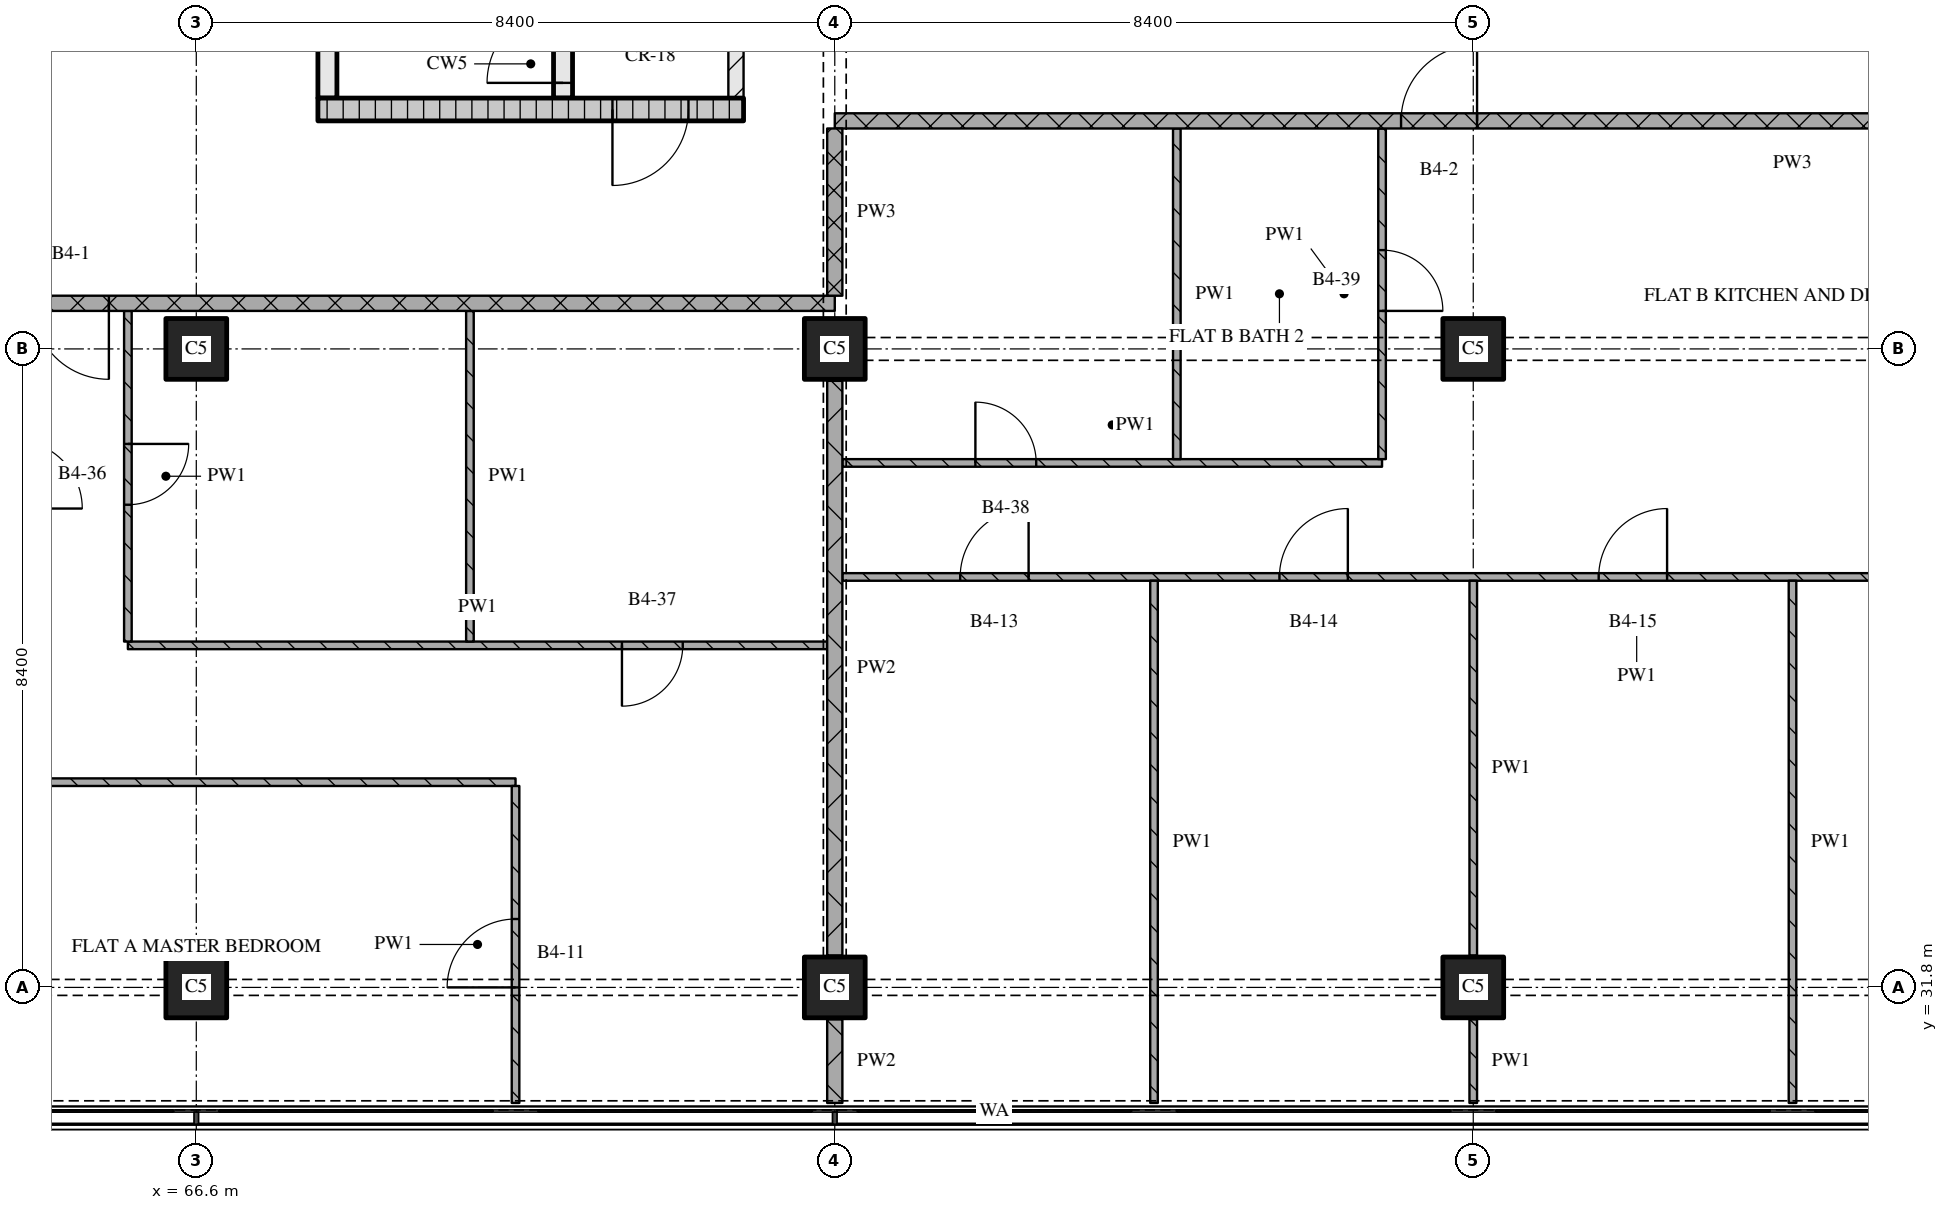
"""IFC4 building model, lengths in metres.
Left out: names, types, materials, properties, quantities, classifications, styles, units other than length and angle.
Written with IfcOpenShell. Run it as: python <this file> out.ifc"""

import sys

from ifc_helpers import new_model, si_unit, direction, frame, frame_2d, origin, origin_2d, place, context, subcontext, project, spatial, rectangle, extrude, element, fill, save


model = new_model("IFC4")
c1 = context("Model", 3, precision=1e-05, world=origin(), true_north=direction((0.0, 1.0)))
c2 = subcontext(c1, "Body", "Model", "MODEL_VIEW")
j1 = project(units=[si_unit("LENGTHUNIT", "METRE"), si_unit("PLANEANGLEUNIT", "RADIAN")], contexts=[c1])
p1 = place(None, origin())
s1 = spatial("IfcSite", under=j1, at=p1, CompositionType="ELEMENT")
p2 = place(p1, origin())
s2 = spatial("IfcBuilding", under=s1, at=p2, CompositionType="ELEMENT")
p3 = place(p2, frame((0.0, 0.0, 134.85)))
s3 = spatial("IfcBuildingStorey", under=s2, at=p3, CompositionType="ELEMENT", Elevation=134.85)
for number, where, z_axis, x_axis in (
    (1, (66.6, 31.8, 0.0), (0.0, 0.0, 1.0), (1.0, 0.0, 0.0)),
    (2, (66.6, 40.2, 0.0), (0.0, 0.0, 1.0), (1.0, 0.0, 0.0)),
    (3, (75.0, 31.8, 0.0), (0.0, 0.0, 1.0), (1.0, 0.0, 0.0)),
    (4, (75.0, 40.2, 0.0), (0.0, 0.0, 1.0), (1.0, 0.0, 0.0)),
    (5, (83.4, 31.8, 0.0), (0.0, 0.0, 1.0), (1.0, 0.0, 0.0)),
    (6, (83.4, 40.2, 0.0), (0.0, 0.0, 1.0), (1.0, 0.0, 0.0)),
):
    element("IfcColumn", number, at=place(p3, frame(where, z_axis=z_axis, x_axis=x_axis)), inside=s3, PredefinedType="COLUMN", context=c2, shape_type="SweptSolid", body=[
        extrude(rectangle(XDim=0.8, YDim=0.8, at=origin_2d()), origin(), (0.0, 0.0, 1.0), 3.6),
    ])
p4 = place(p3, frame((68.2, 43.35, 0.0), z_axis=(0.0, 0.0, 1.0), x_axis=(1.0, 0.0, 0.0)))
e7 = element("IfcWall", 7, at=p4, inside=s3, PredefinedType="SOLIDWALL", context=c2, shape_type="SweptSolid", body=[
    extrude(rectangle(XDim=5.6, YDim=0.3, at=frame_2d((2.8, 0.0))), origin(), (0.0, 0.0, 1.0), 3.32),
])
p5 = place(p4, frame((3.875, 0.0, 0.0)))
e8 = element("IfcOpeningElement", 8, at=p5, cuts=e7, PredefinedType="OPENING", context=c2, shape_type="SweptSolid", body=[
    extrude(rectangle(XDim=1.0, YDim=2.1, at=frame_2d((0.5, 1.05))), frame((0.0, 0.16, 0.0), z_axis=(0.0, -1.0, 0.0), x_axis=(1.0, 0.0, 0.0)), (0.0, 0.0, 1.0), 0.32),
])
p6 = place(p3, frame((68.325, 43.5, 0.0), z_axis=(0.0, 0.0, 1.0), x_axis=(0.0, 1.0, 0.0)))
e9 = element("IfcWall", 9, at=p6, inside=s3, PredefinedType="SOLIDWALL", context=c2, shape_type="SweptSolid", body=[
    extrude(rectangle(XDim=6.9, YDim=0.25, at=frame_2d((3.45, 0.0))), origin(), (0.0, 0.0, 1.0), 3.32),
])
p7 = place(p3, frame((71.425, 43.5, 0.0), z_axis=(0.0, 0.0, 1.0), x_axis=(0.0, 1.0, 0.0)))
e10 = element("IfcWall", 10, at=p7, inside=s3, PredefinedType="SOLIDWALL", context=c2, shape_type="SweptSolid", body=[
    extrude(rectangle(XDim=6.9, YDim=0.25, at=frame_2d((3.45, 0.0))), origin(), (0.0, 0.0, 1.0), 3.32),
])
p8 = place(p7, frame((0.2, 0.0, 0.0)))
e11 = element("IfcOpeningElement", 11, at=p8, cuts=e10, PredefinedType="OPENING", context=c2, shape_type="SweptSolid", body=[
    extrude(rectangle(XDim=1.0, YDim=2.1, at=frame_2d((0.5, 1.05))), frame((0.0, 0.135, 0.0), z_axis=(0.0, -1.0, 0.0), x_axis=(1.0, 0.0, 0.0)), (0.0, 0.0, 1.0), 0.27),
])
p9 = place(p3, frame((73.7, 43.5, 0.0), z_axis=(0.0, 0.0, 1.0), x_axis=(0.0, 1.0, 0.0)))
e12 = element("IfcWall", 12, at=p9, inside=s3, PredefinedType="PARTITIONING", context=c2, shape_type="SweptSolid", body=[
    extrude(rectangle(XDim=6.9, YDim=0.2, at=frame_2d((3.45, 0.0))), origin(), (0.0, 0.0, 1.0), 3.32),
])
p10 = place(p9, frame((1.0, 0.0, 0.0)))
e13 = element("IfcOpeningElement", 13, at=p10, cuts=e12, PredefinedType="OPENING", context=c2, shape_type="SweptSolid", body=[
    extrude(rectangle(XDim=1.0, YDim=2.1, at=frame_2d((0.5, 1.05))), frame((0.0, 0.11, 0.0), z_axis=(0.0, -1.0, 0.0), x_axis=(1.0, 0.0, 0.0)), (0.0, 0.0, 1.0), 0.22),
])
p11 = place(p3, frame((70.8, 34.5, 0.0), z_axis=(0.0, 0.0, 1.0), x_axis=(-1.0, 0.0, 0.0)))
e14 = element("IfcWall", 14, at=p11, inside=s3, PredefinedType="PARTITIONING", context=c2, shape_type="SweptSolid", body=[
    extrude(rectangle(XDim=22.52, YDim=0.1, at=frame_2d((11.26, 0.0))), origin(), (0.0, 0.0, 1.0), 3.32),
])
p12 = place(p11, frame((10.05, 0.0, 0.0)))
e15 = element("IfcOpeningElement", 15, at=p12, cuts=e14, PredefinedType="OPENING", context=c2, shape_type="SweptSolid", body=[
    extrude(rectangle(XDim=0.9, YDim=2.1, at=frame_2d((0.45, 1.05))), frame((0.0, 0.06, 0.0), z_axis=(0.0, -1.0, 0.0), x_axis=(1.0, 0.0, 0.0)), (0.0, 0.0, 1.0), 0.12),
])
p13 = place(p11, frame((14.25, 0.0, 0.0)))
e16 = element("IfcOpeningElement", 16, at=p13, cuts=e14, PredefinedType="OPENING", context=c2, shape_type="SweptSolid", body=[
    extrude(rectangle(XDim=0.9, YDim=2.1, at=frame_2d((0.45, 1.05))), frame((0.0, 0.06, 0.0), z_axis=(0.0, -1.0, 0.0), x_axis=(1.0, 0.0, 0.0)), (0.0, 0.0, 1.0), 0.12),
])
p14 = place(p11, frame((17.654, 0.0, 0.0)))
e17 = element("IfcOpeningElement", 17, at=p14, cuts=e14, PredefinedType="OPENING", context=c2, shape_type="SweptSolid", body=[
    extrude(rectangle(XDim=0.9, YDim=2.1, at=frame_2d((0.45, 1.05))), frame((0.0, 0.06, 0.0), z_axis=(0.0, -1.0, 0.0), x_axis=(1.0, 0.0, 0.0)), (0.0, 0.0, 1.0), 0.12),
])
p15 = place(p3, frame((65.7, 36.3, 0.0), z_axis=(0.0, 0.0, 1.0), x_axis=(1.0, 0.0, 0.0)))
e18 = element("IfcWall", 18, at=p15, inside=s3, PredefinedType="PARTITIONING", context=c2, shape_type="SweptSolid", body=[
    extrude(rectangle(XDim=9.2, YDim=0.1, at=frame_2d((4.6, 0.0))), origin(), (0.0, 0.0, 1.0), 3.32),
])
p16 = place(p15, frame((6.5, 0.0, 0.0)))
e19 = element("IfcOpeningElement", 19, at=p16, cuts=e18, PredefinedType="OPENING", context=c2, shape_type="SweptSolid", body=[
    extrude(rectangle(XDim=0.8, YDim=2.1, at=frame_2d((0.4, 1.05))), frame((0.0, 0.06, 0.0), z_axis=(0.0, -1.0, 0.0), x_axis=(1.0, 0.0, 0.0)), (0.0, 0.0, 1.0), 0.12),
])
p17 = place(p3, frame((96.0, 37.2, 0.0), z_axis=(0.0, 0.0, 1.0), x_axis=(-1.0, 0.0, 0.0)))
e20 = element("IfcWall", 20, at=p17, inside=s3, PredefinedType="PARTITIONING", context=c2, shape_type="SweptSolid", body=[
    extrude(rectangle(XDim=20.9, YDim=0.1, at=frame_2d((10.45, 0.0))), origin(), (0.0, 0.0, 1.0), 3.32),
])
p18 = place(p17, frame((10.05, 0.0, 0.0)))
e21 = element("IfcOpeningElement", 21, at=p18, cuts=e20, PredefinedType="OPENING", context=c2, shape_type="SweptSolid", body=[
    extrude(rectangle(XDim=0.9, YDim=2.1, at=frame_2d((0.45, 1.05))), frame((0.0, 0.06, 0.0), z_axis=(0.0, -1.0, 0.0), x_axis=(1.0, 0.0, 0.0)), (0.0, 0.0, 1.0), 0.12),
])
p19 = place(p17, frame((14.25, 0.0, 0.0)))
e22 = element("IfcOpeningElement", 22, at=p19, cuts=e20, PredefinedType="OPENING", context=c2, shape_type="SweptSolid", body=[
    extrude(rectangle(XDim=0.9, YDim=2.1, at=frame_2d((0.45, 1.05))), frame((0.0, 0.06, 0.0), z_axis=(0.0, -1.0, 0.0), x_axis=(1.0, 0.0, 0.0)), (0.0, 0.0, 1.0), 0.12),
])
p20 = place(p17, frame((18.45, 0.0, 0.0)))
e23 = element("IfcOpeningElement", 23, at=p20, cuts=e20, PredefinedType="OPENING", context=c2, shape_type="SweptSolid", body=[
    extrude(rectangle(XDim=0.9, YDim=2.1, at=frame_2d((0.45, 1.05))), frame((0.0, 0.06, 0.0), z_axis=(0.0, -1.0, 0.0), x_axis=(1.0, 0.0, 0.0)), (0.0, 0.0, 1.0), 0.12),
])
p21 = place(p3, frame((75.1, 38.7, 0.0), z_axis=(0.0, 0.0, 1.0), x_axis=(1.0, 0.0, 0.0)))
e24 = element("IfcWall", 24, at=p21, inside=s3, PredefinedType="PARTITIONING", context=c2, shape_type="SweptSolid", body=[
    extrude(rectangle(XDim=7.1, YDim=0.1, at=frame_2d((3.55, 0.0))), origin(), (0.0, 0.0, 1.0), 3.32),
])
p22 = place(p21, frame((1.75, 0.0, 0.0)))
e25 = element("IfcOpeningElement", 25, at=p22, cuts=e24, PredefinedType="OPENING", context=c2, shape_type="SweptSolid", body=[
    extrude(rectangle(XDim=0.8, YDim=2.1, at=frame_2d((0.4, 1.05))), frame((0.0, 0.06, 0.0), z_axis=(0.0, -1.0, 0.0), x_axis=(1.0, 0.0, 0.0)), (0.0, 0.0, 1.0), 0.12),
])
p23 = place(p3, frame((75.0, 40.8, 0.0), z_axis=(0.0, 0.0, 1.0), x_axis=(-1.0, 0.0, 0.0)))
e26 = element("IfcWall", 26, at=p23, inside=s3, PredefinedType="PARTITIONING", context=c2, shape_type="SweptSolid", body=[
    extrude(rectangle(XDim=24.18, YDim=0.2, at=frame_2d((12.09, 0.0))), origin(), (0.0, 0.0, 1.0), 3.32),
])
p24 = place(p23, frame((9.55, 0.0, 0.0)))
e27 = element("IfcOpeningElement", 27, at=p24, cuts=e26, PredefinedType="OPENING", context=c2, shape_type="SweptSolid", body=[
    extrude(rectangle(XDim=1.0, YDim=2.1, at=frame_2d((0.5, 1.05))), frame((0.0, 0.11, 0.0), z_axis=(0.0, -1.0, 0.0), x_axis=(1.0, 0.0, 0.0)), (0.0, 0.0, 1.0), 0.22),
])
p25 = place(p3, frame((100.2, 43.2, 0.0), z_axis=(0.0, 0.0, 1.0), x_axis=(-1.0, 0.0, 0.0)))
e28 = element("IfcWall", 28, at=p25, inside=s3, PredefinedType="PARTITIONING", context=c2, shape_type="SweptSolid", body=[
    extrude(rectangle(XDim=25.2, YDim=0.2, at=frame_2d((12.6, 0.0))), origin(), (0.0, 0.0, 1.0), 3.32),
])
p26 = place(p25, frame((16.75, 0.0, 0.0)))
e29 = element("IfcOpeningElement", 29, at=p26, cuts=e28, PredefinedType="OPENING", context=c2, shape_type="SweptSolid", body=[
    extrude(rectangle(XDim=1.0, YDim=2.1, at=frame_2d((0.5, 1.05))), frame((0.0, 0.11, 0.0), z_axis=(0.0, -1.0, 0.0), x_axis=(1.0, 0.0, 0.0)), (0.0, 0.0, 1.0), 0.22),
])
p27 = place(p3, frame((65.7, 40.7, 0.0), z_axis=(0.0, 0.0, 1.0), x_axis=(0.0, -1.0, 0.0)))
e30 = element("IfcWall", 30, at=p27, inside=s3, PredefinedType="PARTITIONING", context=c2, shape_type="SweptSolid", body=[
    extrude(rectangle(XDim=4.35, YDim=0.1, at=frame_2d((2.175, 0.0))), origin(), (0.0, 0.0, 1.0), 3.32),
])
p28 = place(p27, frame((1.75, 0.0, 0.0)))
e31 = element("IfcOpeningElement", 31, at=p28, cuts=e30, PredefinedType="OPENING", context=c2, shape_type="SweptSolid", body=[
    extrude(rectangle(XDim=0.8, YDim=2.1, at=frame_2d((0.4, 1.05))), frame((0.0, 0.06, 0.0), z_axis=(0.0, -1.0, 0.0), x_axis=(1.0, 0.0, 0.0)), (0.0, 0.0, 1.0), 0.12),
])
p29 = place(p3, frame((70.2, 40.7, 0.0), z_axis=(0.0, 0.0, 1.0), x_axis=(0.0, -1.0, 0.0)))
e32 = element("IfcWall", 32, at=p29, inside=s3, PredefinedType="PARTITIONING", context=c2, shape_type="SweptSolid", body=[
    extrude(rectangle(XDim=4.35, YDim=0.1, at=frame_2d((2.175, 0.0))), origin(), (0.0, 0.0, 1.0), 3.32),
])
p30 = place(p3, frame((70.8, 30.28, 0.0), z_axis=(0.0, 0.0, 1.0), x_axis=(0.0, 1.0, 0.0)))
e33 = element("IfcWall", 33, at=p30, inside=s3, PredefinedType="PARTITIONING", context=c2, shape_type="SweptSolid", body=[
    extrude(rectangle(XDim=4.17, YDim=0.1, at=frame_2d((2.085, 0.0))), origin(), (0.0, 0.0, 1.0), 3.32),
])
p31 = place(p30, frame((1.52, 0.0, 0.0)))
e34 = element("IfcOpeningElement", 34, at=p31, cuts=e33, PredefinedType="OPENING", context=c2, shape_type="SweptSolid", body=[
    extrude(rectangle(XDim=0.9, YDim=2.1, at=frame_2d((0.45, 1.05))), frame((0.0, 0.06, 0.0), z_axis=(0.0, -1.0, 0.0), x_axis=(1.0, 0.0, 0.0)), (0.0, 0.0, 1.0), 0.12),
])
p32 = place(p3, frame((75.0, 43.1, 0.0), z_axis=(0.0, 0.0, 1.0), x_axis=(0.0, -1.0, 0.0)))
e35 = element("IfcWall", 35, at=p32, inside=s3, PredefinedType="PARTITIONING", context=c2, shape_type="SweptSolid", body=[
    extrude(rectangle(XDim=2.2, YDim=0.2, at=frame_2d((1.1, 0.0))), origin(), (0.0, 0.0, 1.0), 2.43),
])
p33 = place(p3, frame((75.0, 31.38, 0.0), z_axis=(0.0, 0.0, 1.0), x_axis=(0.0, -1.0, 0.0)))
e36 = element("IfcWall", 36, at=p33, inside=s3, PredefinedType="PARTITIONING", context=c2, shape_type="SweptSolid", body=[
    extrude(rectangle(XDim=1.1, YDim=0.2, at=frame_2d((0.55, 0.0))), origin(), (0.0, 0.0, 1.0), 3.32),
])
p34 = place(p3, frame((75.0, 39.78, 0.0), z_axis=(0.0, 0.0, 1.0), x_axis=(0.0, -1.0, 0.0)))
e37 = element("IfcWall", 37, at=p34, inside=s3, PredefinedType="PARTITIONING", context=c2, shape_type="SweptSolid", body=[
    extrude(rectangle(XDim=7.56, YDim=0.2, at=frame_2d((3.78, 0.0))), origin(), (0.0, 0.0, 1.0), 2.83),
])
p35 = place(p3, frame((79.2, 37.15, 0.0), z_axis=(0.0, 0.0, 1.0), x_axis=(0.0, -1.0, 0.0)))
e38 = element("IfcWall", 38, at=p35, inside=s3, PredefinedType="PARTITIONING", context=c2, shape_type="SweptSolid", body=[
    extrude(rectangle(XDim=6.87, YDim=0.1, at=frame_2d((3.435, 0.0))), origin(), (0.0, 0.0, 1.0), 3.32),
])
p36 = place(p3, frame((79.5, 43.1, 0.0), z_axis=(0.0, 0.0, 1.0), x_axis=(0.0, -1.0, 0.0)))
e39 = element("IfcWall", 39, at=p36, inside=s3, PredefinedType="PARTITIONING", context=c2, shape_type="SweptSolid", body=[
    extrude(rectangle(XDim=4.35, YDim=0.1, at=frame_2d((2.175, 0.0))), origin(), (0.0, 0.0, 1.0), 3.32),
])
p37 = place(p3, frame((82.2, 38.75, 0.0), z_axis=(0.0, 0.0, 1.0), x_axis=(0.0, 1.0, 0.0)))
e40 = element("IfcWall", 40, at=p37, inside=s3, PredefinedType="PARTITIONING", context=c2, shape_type="SweptSolid", body=[
    extrude(rectangle(XDim=4.35, YDim=0.1, at=frame_2d((2.175, 0.0))), origin(), (0.0, 0.0, 1.0), 3.32),
])
p38 = place(p37, frame((1.95, 0.0, 0.0)))
e41 = element("IfcOpeningElement", 41, at=p38, cuts=e40, PredefinedType="OPENING", context=c2, shape_type="SweptSolid", body=[
    extrude(rectangle(XDim=0.8, YDim=2.1, at=frame_2d((0.4, 1.05))), frame((0.0, 0.06, 0.0), z_axis=(0.0, -1.0, 0.0), x_axis=(1.0, 0.0, 0.0)), (0.0, 0.0, 1.0), 0.12),
])
p39 = place(p3, frame((83.4, 31.38, 0.0), z_axis=(0.0, 0.0, 1.0), x_axis=(0.0, -1.0, 0.0)))
e42 = element("IfcWall", 42, at=p39, inside=s3, PredefinedType="PARTITIONING", context=c2, shape_type="SweptSolid", body=[
    extrude(rectangle(XDim=1.1, YDim=0.1, at=frame_2d((0.55, 0.0))), origin(), (0.0, 0.0, 1.0), 2.72),
])
p40 = place(p3, frame((83.4, 37.15, 0.0), z_axis=(0.0, 0.0, 1.0), x_axis=(0.0, -1.0, 0.0)))
e43 = element("IfcWall", 43, at=p40, inside=s3, PredefinedType="PARTITIONING", context=c2, shape_type="SweptSolid", body=[
    extrude(rectangle(XDim=4.93, YDim=0.1, at=frame_2d((2.465, 0.0))), origin(), (0.0, 0.0, 1.0), 3.32),
])
p41 = place(p3, frame((87.6, 37.15, 0.0), z_axis=(0.0, 0.0, 1.0), x_axis=(0.0, -1.0, 0.0)))
e44 = element("IfcWall", 44, at=p41, inside=s3, PredefinedType="PARTITIONING", context=c2, shape_type="SweptSolid", body=[
    extrude(rectangle(XDim=6.87, YDim=0.1, at=frame_2d((3.435, 0.0))), origin(), (0.0, 0.0, 1.0), 3.32),
])
p42 = place(p5, origin())
e45 = element("IfcDoor", 45, at=p42, inside=s3, OperationType="SINGLE_SWING_RIGHT", PredefinedType="DOOR", context=c2, shape_type="SweptSolid", body=[
    extrude(rectangle(XDim=1.0, YDim=2.1, at=frame_2d((0.5, 1.05))), frame((0.0, 0.025, 0.0), z_axis=(0.0, -1.0, 0.0), x_axis=(1.0, 0.0, 0.0)), (0.0, 0.0, 1.0), 0.05),
])
fill(e8, e45)
p43 = place(p8, origin())
e46 = element("IfcDoor", 46, at=p43, inside=s3, OperationType="SINGLE_SWING_LEFT", PredefinedType="DOOR", context=c2, shape_type="SweptSolid", body=[
    extrude(rectangle(XDim=1.0, YDim=2.1, at=frame_2d((0.5, 1.05))), frame((0.0, 0.025, 0.0), z_axis=(0.0, -1.0, 0.0), x_axis=(1.0, 0.0, 0.0)), (0.0, 0.0, 1.0), 0.05),
])
fill(e11, e46)
p44 = place(p16, origin())
e47 = element("IfcDoor", 47, at=p44, inside=s3, OperationType="SINGLE_SWING_RIGHT", PredefinedType="DOOR", context=c2, shape_type="SweptSolid", body=[
    extrude(rectangle(XDim=0.8, YDim=2.1, at=frame_2d((0.4, 1.05))), frame((0.0, 0.025, 0.0), z_axis=(0.0, -1.0, 0.0), x_axis=(1.0, 0.0, 0.0)), (0.0, 0.0, 1.0), 0.05),
])
fill(e19, e47)
p45 = place(p18, origin())
e48 = element("IfcDoor", 48, at=p45, inside=s3, OperationType="SINGLE_SWING_RIGHT", PredefinedType="DOOR", context=c2, shape_type="SweptSolid", body=[
    extrude(rectangle(XDim=0.9, YDim=2.1, at=frame_2d((0.45, 1.05))), frame((0.0, 0.025, 0.0), z_axis=(0.0, -1.0, 0.0), x_axis=(1.0, 0.0, 0.0)), (0.0, 0.0, 1.0), 0.05),
])
fill(e21, e48)
p46 = place(p19, origin())
e49 = element("IfcDoor", 49, at=p46, inside=s3, OperationType="SINGLE_SWING_RIGHT", PredefinedType="DOOR", context=c2, shape_type="SweptSolid", body=[
    extrude(rectangle(XDim=0.9, YDim=2.1, at=frame_2d((0.45, 1.05))), frame((0.0, 0.025, 0.0), z_axis=(0.0, -1.0, 0.0), x_axis=(1.0, 0.0, 0.0)), (0.0, 0.0, 1.0), 0.05),
])
fill(e22, e49)
p47 = place(p20, origin())
e50 = element("IfcDoor", 50, at=p47, inside=s3, OperationType="SINGLE_SWING_RIGHT", PredefinedType="DOOR", context=c2, shape_type="SweptSolid", body=[
    extrude(rectangle(XDim=0.9, YDim=2.1, at=frame_2d((0.45, 1.05))), frame((0.0, 0.025, 0.0), z_axis=(0.0, -1.0, 0.0), x_axis=(1.0, 0.0, 0.0)), (0.0, 0.0, 1.0), 0.05),
])
fill(e23, e50)
p48 = place(p22, origin())
e51 = element("IfcDoor", 51, at=p48, inside=s3, OperationType="SINGLE_SWING_LEFT", PredefinedType="DOOR", context=c2, shape_type="SweptSolid", body=[
    extrude(rectangle(XDim=0.8, YDim=2.1, at=frame_2d((0.4, 1.05))), frame((0.0, 0.025, 0.0), z_axis=(0.0, -1.0, 0.0), x_axis=(1.0, 0.0, 0.0)), (0.0, 0.0, 1.0), 0.05),
])
fill(e25, e51)
p49 = place(p24, origin())
e52 = element("IfcDoor", 52, at=p49, inside=s3, OperationType="SINGLE_SWING_LEFT", PredefinedType="DOOR", context=c2, shape_type="SweptSolid", body=[
    extrude(rectangle(XDim=1.0, YDim=2.1, at=frame_2d((0.5, 1.05))), frame((0.0, 0.025, 0.0), z_axis=(0.0, -1.0, 0.0), x_axis=(1.0, 0.0, 0.0)), (0.0, 0.0, 1.0), 0.05),
])
fill(e27, e52)
p50 = place(p26, origin())
e53 = element("IfcDoor", 53, at=p50, inside=s3, OperationType="SINGLE_SWING_RIGHT", PredefinedType="DOOR", context=c2, shape_type="SweptSolid", body=[
    extrude(rectangle(XDim=1.0, YDim=2.1, at=frame_2d((0.5, 1.05))), frame((0.0, 0.025, 0.0), z_axis=(0.0, -1.0, 0.0), x_axis=(1.0, 0.0, 0.0)), (0.0, 0.0, 1.0), 0.05),
])
fill(e29, e53)
p51 = place(p28, origin())
e54 = element("IfcDoor", 54, at=p51, inside=s3, OperationType="SINGLE_SWING_LEFT", PredefinedType="DOOR", context=c2, shape_type="SweptSolid", body=[
    extrude(rectangle(XDim=0.8, YDim=2.1, at=frame_2d((0.4, 1.05))), frame((0.0, 0.025, 0.0), z_axis=(0.0, -1.0, 0.0), x_axis=(1.0, 0.0, 0.0)), (0.0, 0.0, 1.0), 0.05),
])
fill(e31, e54)
p52 = place(p31, origin())
e55 = element("IfcDoor", 55, at=p52, inside=s3, OperationType="SINGLE_SWING_LEFT", PredefinedType="DOOR", context=c2, shape_type="SweptSolid", body=[
    extrude(rectangle(XDim=0.9, YDim=2.1, at=frame_2d((0.45, 1.05))), frame((0.0, 0.025, 0.0), z_axis=(0.0, -1.0, 0.0), x_axis=(1.0, 0.0, 0.0)), (0.0, 0.0, 1.0), 0.05),
])
fill(e34, e55)
p53 = place(p38, origin())
e56 = element("IfcDoor", 56, at=p53, inside=s3, OperationType="SINGLE_SWING_RIGHT", PredefinedType="DOOR", context=c2, shape_type="SweptSolid", body=[
    extrude(rectangle(XDim=0.8, YDim=2.1, at=frame_2d((0.4, 1.05))), frame((0.0, 0.025, 0.0), z_axis=(0.0, -1.0, 0.0), x_axis=(1.0, 0.0, 0.0)), (0.0, 0.0, 1.0), 0.05),
])
fill(e41, e56)
save(model, sys.argv[1])
